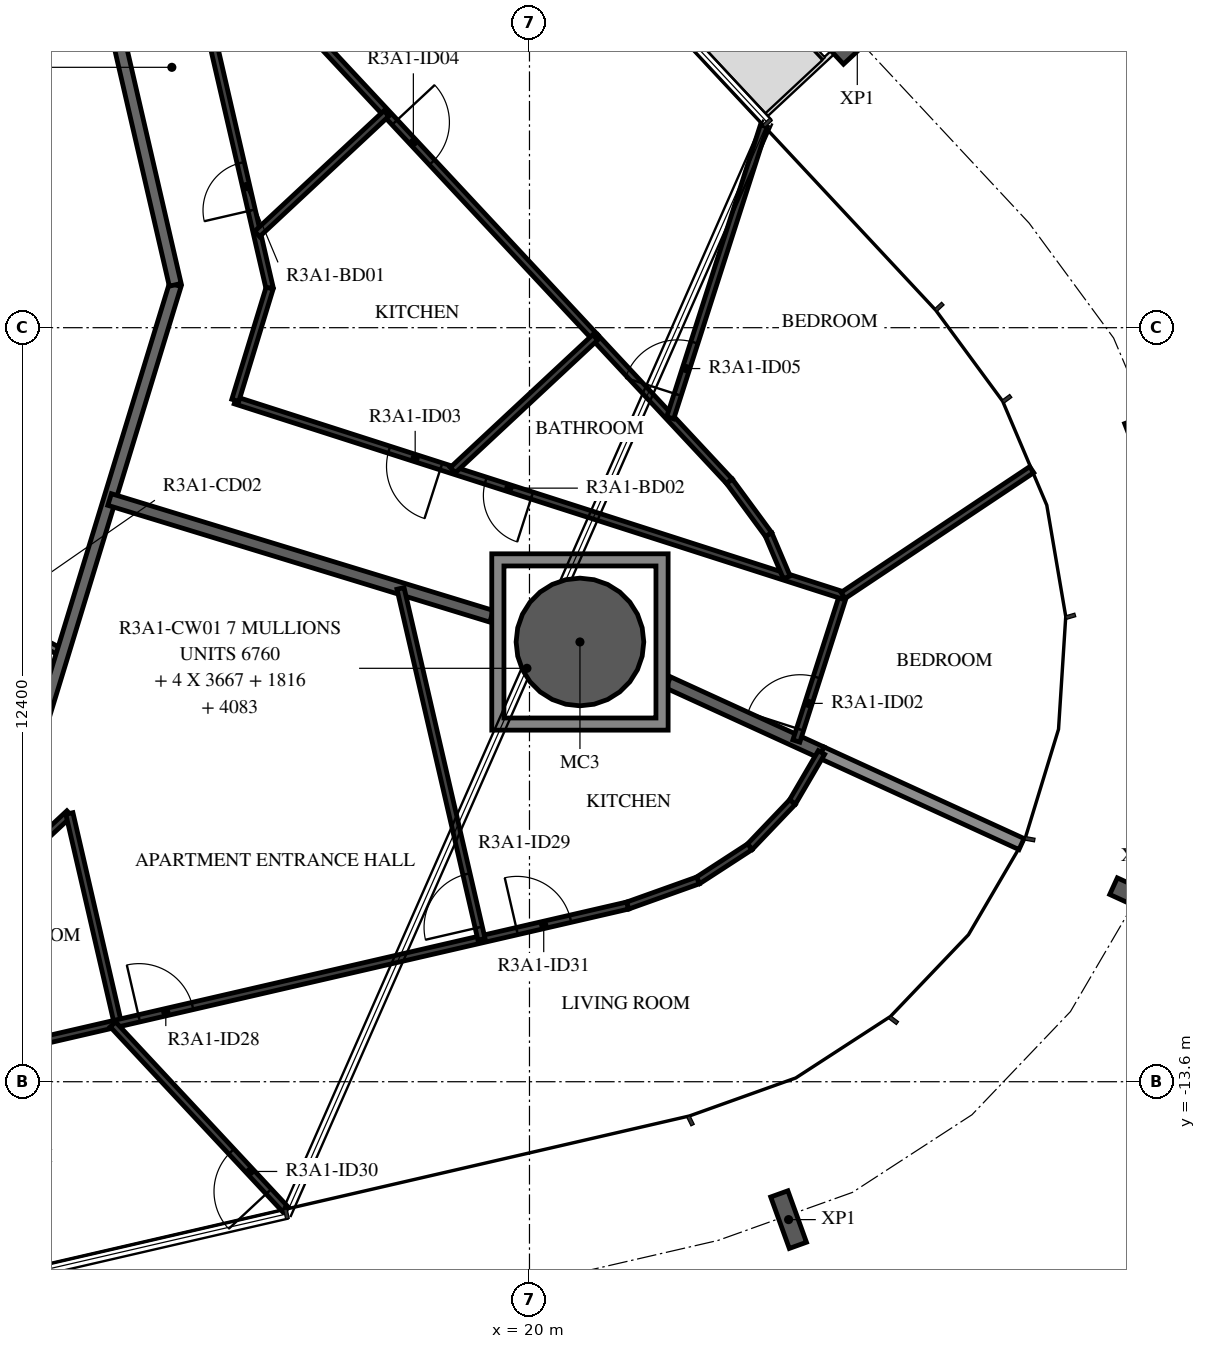
"""IFC4 building model, lengths in metres.
Left out: names, types, materials, properties, quantities, classifications, styles, units other than length and angle.
Written with IfcOpenShell. Run it as: python <this file> out.ifc"""

import sys

from ifc_helpers import new_model, si_unit, direction, frame, frame_2d, origin, origin_2d, place, context, subcontext, project, spatial, polyline, rectangle, hollow_circle, i_section, outline, extrude, element, fill, save


model = new_model("IFC4")
c1 = context("Model", 3, precision=1e-05, world=origin(), true_north=direction((0.0, 1.0)))
c2 = subcontext(c1, "Body", "Model", "MODEL_VIEW")
j1 = project(units=[si_unit("LENGTHUNIT", "METRE"), si_unit("PLANEANGLEUNIT", "RADIAN")], contexts=[c1])
p1 = place(None, origin())
s1 = spatial("IfcSite", under=j1, at=p1, CompositionType="ELEMENT")
p2 = place(p1, origin())
s2 = spatial("IfcBuilding", under=s1, at=p2, CompositionType="ELEMENT")
p3 = place(p2, frame((0.0, 0.0, 116.9)))
s3 = spatial("IfcBuildingStorey", under=s2, at=p3, CompositionType="ELEMENT", Elevation=116.9)
p4 = place(p3, frame((20.83, -6.368, -0.38), z_axis=(0.0, 0.0, 1.0), x_axis=(1.0, 0.0, 0.0)))
e1 = element("IfcColumn", 1, at=p4, inside=s3, PredefinedType="COLUMN", context=c2, shape_type="SweptSolid", body=[
    extrude(hollow_circle(Radius=1.05, WallThickness=0.05, at=origin_2d()), origin(), (0.0, 0.0, 1.0), 3.5),
])
for number, where, z_axis, x_axis in (
    (2, (24.261, -15.868, -0.38), (0.0, 0.0, 1.0), (-0.941, -0.34, 0.0)),
    (3, (30.014, -10.571, -0.38), (0.0, 0.0, 1.0), (-0.416, -0.909, 0.0)),
    (4, (30.262, -2.756, -0.38), (0.0, 0.0, 1.0), (0.358, -0.934, 0.0)),
    (5, (25.391, 3.55, -0.38), (0.0, 0.0, 1.0), (0.682, -0.731, 0.0)),
):
    element("IfcColumn", number, at=place(p3, frame(where, z_axis=z_axis, x_axis=x_axis)), inside=s3, PredefinedType="COLUMN", context=c2, shape_type="SweptSolid", body=[
        extrude(i_section(OverallWidth=0.3, OverallDepth=0.9, WebThickness=0.019, FlangeThickness=0.035, FilletRadius=0.03, at=origin_2d()), origin(), (0.0, 0.0, 1.0), 3.5),
    ])
p5 = place(p3, frame((10.511, -5.589, 0.0), z_axis=(0.0, 0.0, 1.0), x_axis=(0.882987820808, -0.469395897196, 0.0)))
e6 = element("IfcWall", 6, at=p5, inside=s3, PredefinedType="PARTITIONING", context=c2, shape_type="SweptSolid", body=[
    extrude(rectangle(XDim=2.052, YDim=0.12, at=frame_2d((1.026, 0.0))), origin(), (0.0, 0.0, 1.0), 3.12),
])
p6 = place(p5, frame((0.1, 0.0, 0.0)))
e7 = element("IfcOpeningElement", 7, at=p6, cuts=e6, PredefinedType="OPENING", context=c2, shape_type="SweptSolid", body=[
    extrude(rectangle(XDim=1.2, YDim=2.1, at=frame_2d((0.6, 1.05))), frame((0.0, 0.07, 0.0), z_axis=(0.0, -1.0, 0.0), x_axis=(1.0, 0.0, 0.0)), (0.0, 0.0, 1.0), 0.14),
])
p7 = place(p3, frame((12.028, -7.516, 0.0), z_axis=(0.0, 0.0, 1.0), x_axis=(0.292365533182, 0.956306642771, 0.0)))
e8 = element("IfcWall", 8, at=p7, inside=s3, PredefinedType="STANDARD", context=c2, shape_type="SweptSolid", body=[
    extrude(rectangle(XDim=7.342, YDim=0.2, at=frame_2d((3.671, 0.0))), origin(), (0.0, 0.0, 1.0), 3.12),
])
p8 = place(p3, frame((14.175, -0.495, 0.0), z_axis=(0.0, 0.0, 1.0), x_axis=(-0.224922649383, 0.974376622151, 0.0)))
e9 = element("IfcWall", 9, at=p8, inside=s3, PredefinedType="STANDARD", context=c2, shape_type="SweptSolid", body=[
    extrude(rectangle(XDim=7.342, YDim=0.2, at=frame_2d((3.671, 0.0))), origin(), (0.0, 0.0, 1.0), 3.12),
])
p9 = place(p3, frame((13.095, -4.026, 0.0), z_axis=(0.0, 0.0, 1.0), x_axis=(0.956303942966, -0.292374363904, 0.0)))
e10 = element("IfcWall", 10, at=p9, inside=s3, PredefinedType="STANDARD", context=c2, shape_type="SweptSolid", body=[
    extrude(rectangle(XDim=6.567, YDim=0.2, at=frame_2d((3.284, 0.0))), origin(), (0.0, 0.0, 1.0), 3.12),
])
p10 = place(p3, frame((22.28, -7.033, 0.0), z_axis=(0.0, 0.0, 1.0), x_axis=(0.909468768003, -0.415772245378, 0.0)))
e11 = element("IfcWall", 11, at=p10, inside=s3, PredefinedType="STANDARD", context=c2, shape_type="SweptSolid", body=[
    extrude(rectangle(XDim=2.773, YDim=0.2, at=frame_2d((1.386, 0.0))), origin(), (0.0, 0.0, 1.0), 3.12),
])
p11 = place(p3, frame((24.802, -8.186, 0.0), z_axis=(0.0, 0.0, 1.0), x_axis=(0.909307466213, -0.416124899387, 0.0)))
e12 = element("IfcWall", 12, at=p11, inside=s3, PredefinedType="STANDARD", context=c2, shape_type="SweptSolid", body=[
    extrude(rectangle(XDim=3.618, YDim=0.2, at=frame_2d((1.809, 0.0))), origin(), (0.0, 0.0, 1.0), 2.73),
])
p12 = place(p3, frame((15.727, -0.549, 0.0), z_axis=(0.0, 0.0, 1.0), x_axis=(-0.22493611855, 0.974373512864, 0.0)))
e13 = element("IfcWall", 13, at=p12, inside=s3, PredefinedType="PARTITIONING", context=c2, shape_type="SweptSolid", body=[
    extrude(rectangle(XDim=8.146, YDim=0.12, at=frame_2d((4.073, 0.0))), origin(), (0.0, 0.0, 1.0), 3.12),
])
p13 = place(p12, frame((1.314, 0.0, 0.0)))
e14 = element("IfcOpeningElement", 14, at=p13, cuts=e13, PredefinedType="OPENING", context=c2, shape_type="SweptSolid", body=[
    extrude(rectangle(XDim=0.8, YDim=2.1, at=frame_2d((0.4, 1.05))), frame((0.0, 0.07, 0.0), z_axis=(0.0, -1.0, 0.0), x_axis=(1.0, 0.0, 0.0)), (0.0, 0.0, 1.0), 0.14),
])
p14 = place(p3, frame((24.389, -7.997, 0.0), z_axis=(0.0, 0.0, 1.0), x_axis=(0.305723184389, 0.952120441188, 0.0)))
e15 = element("IfcWall", 15, at=p14, inside=s3, PredefinedType="PARTITIONING", context=c2, shape_type="SweptSolid", body=[
    extrude(rectangle(XDim=2.515, YDim=0.12, at=frame_2d((1.257, 0.0))), origin(), (0.0, 0.0, 1.0), 3.12),
])
p15 = place(p14, frame((0.2, 0.0, 0.0)))
e16 = element("IfcOpeningElement", 16, at=p15, cuts=e15, PredefinedType="OPENING", context=c2, shape_type="SweptSolid", body=[
    extrude(rectangle(XDim=0.9, YDim=2.1, at=frame_2d((0.45, 1.05))), frame((0.0, 0.07, 0.0), z_axis=(0.0, -1.0, 0.0), x_axis=(1.0, 0.0, 0.0)), (0.0, 0.0, 1.0), 0.14),
])
p16 = place(p3, frame((25.158, -5.603, 0.0), z_axis=(0.0, 0.0, 1.0), x_axis=(-0.952147783118, 0.305638019729, 0.0)))
e17 = element("IfcWall", 17, at=p16, inside=s3, PredefinedType="PARTITIONING", context=c2, shape_type="SweptSolid", body=[
    extrude(rectangle(XDim=10.498, YDim=0.12, at=frame_2d((5.249, 0.0))), origin(), (0.0, 0.0, 1.0), 3.12),
])
p17 = place(p16, frame((5.373, 0.0, 0.0)))
e18 = element("IfcOpeningElement", 18, at=p17, cuts=e17, PredefinedType="OPENING", context=c2, shape_type="SweptSolid", body=[
    extrude(rectangle(XDim=0.8, YDim=2.1, at=frame_2d((0.4, 1.05))), frame((0.0, 0.07, 0.0), z_axis=(0.0, -1.0, 0.0), x_axis=(1.0, 0.0, 0.0)), (0.0, 0.0, 1.0), 0.14),
])
p18 = place(p16, frame((6.941, 0.0, 0.0)))
e19 = element("IfcOpeningElement", 19, at=p18, cuts=e17, PredefinedType="OPENING", context=c2, shape_type="SweptSolid", body=[
    extrude(rectangle(XDim=0.9, YDim=2.1, at=frame_2d((0.45, 1.05))), frame((0.0, 0.07, 0.0), z_axis=(0.0, -1.0, 0.0), x_axis=(1.0, 0.0, 0.0)), (0.0, 0.0, 1.0), 0.14),
])
p19 = place(p3, frame((15.162, -2.395, 0.0), z_axis=(0.0, 0.0, 1.0), x_axis=(0.292404972776, 0.956294584266, 0.0)))
e20 = element("IfcWall", 20, at=p19, inside=s3, PredefinedType="PARTITIONING", context=c2, shape_type="SweptSolid", body=[
    extrude(rectangle(XDim=1.929, YDim=0.12, at=frame_2d((0.965, 0.0))), origin(), (0.0, 0.0, 1.0), 3.12),
])
p20 = place(p3, frame((14.213, 6.006, 0.0), z_axis=(0.0, 0.0, 1.0), x_axis=(0.681982148724, -0.731368818601, 0.0)))
e21 = element("IfcWall", 21, at=p20, inside=s3, PredefinedType="PARTITIONING", context=c2, shape_type="SweptSolid", body=[
    extrude(rectangle(XDim=10.07, YDim=0.12, at=frame_2d((5.035, 0.0))), origin(), (0.0, 0.0, 1.0), 3.12),
])
p21 = place(p20, frame((5.235, 0.0, 0.0)))
e22 = element("IfcOpeningElement", 22, at=p21, cuts=e21, PredefinedType="OPENING", context=c2, shape_type="SweptSolid", body=[
    extrude(rectangle(XDim=0.9, YDim=2.1, at=frame_2d((0.45, 1.05))), frame((0.0, 0.07, 0.0), z_axis=(0.0, -1.0, 0.0), x_axis=(1.0, 0.0, 0.0)), (0.0, 0.0, 1.0), 0.14),
])
p22 = place(p3, frame((21.081, -1.359, 0.0), z_axis=(0.0, 0.0, 1.0), x_axis=(0.682046729342, -0.731308593545, 0.0)))
e23 = element("IfcWall", 23, at=p22, inside=s3, PredefinedType="PARTITIONING", context=c2, shape_type="SweptSolid", body=[
    extrude(rectangle(XDim=3.236, YDim=0.12, at=frame_2d((1.618, 0.0))), origin(), (0.0, 0.0, 1.0), 3.12),
])
p23 = place(p3, frame((22.314, -2.681, 0.0), z_axis=(0.0, 0.0, 1.0), x_axis=(0.305629733216, 0.952150443036, 0.0)))
e24 = element("IfcWall", 24, at=p23, inside=s3, PredefinedType="PARTITIONING", context=c2, shape_type="SweptSolid", body=[
    extrude(rectangle(XDim=5.041, YDim=0.12, at=frame_2d((2.52, 0.0))), origin(), (0.0, 0.0, 1.0), 3.12),
])
p24 = place(p23, frame((0.4, 0.0, 0.0)))
e25 = element("IfcOpeningElement", 25, at=p24, cuts=e24, PredefinedType="OPENING", context=c2, shape_type="SweptSolid", body=[
    extrude(rectangle(XDim=0.9, YDim=2.1, at=frame_2d((0.45, 1.05))), frame((0.0, 0.07, 0.0), z_axis=(0.0, -1.0, 0.0), x_axis=(1.0, 0.0, 0.0)), (0.0, 0.0, 1.0), 0.14),
])
p25 = place(p3, frame((15.521, 0.341, 0.0), z_axis=(0.0, 0.0, 1.0), x_axis=(0.73140706136, 0.681941134257, 0.0)))
e26 = element("IfcWall", 26, at=p25, inside=s3, PredefinedType="PARTITIONING", context=c2, shape_type="SweptSolid", body=[
    extrude(rectangle(XDim=2.907, YDim=0.12, at=frame_2d((1.454, 0.0))), origin(), (0.0, 0.0, 1.0), 3.12),
])
p26 = place(p3, frame((28.259, -3.535, 0.0), z_axis=(0.0, 0.0, 1.0), x_axis=(-0.831969683957, -0.554821092765, 0.0)))
e27 = element("IfcWall", 27, at=p26, inside=s3, PredefinedType="PARTITIONING", context=c2, shape_type="SweptSolid", body=[
    extrude(rectangle(XDim=3.728, YDim=0.12, at=frame_2d((1.864, 0.0))), origin(), (0.0, 0.0, 1.0), 2.73),
])
p27 = place(p3, frame((24.231, -5.306, 0.0), z_axis=(0.0, 0.0, 1.0), x_axis=(-0.390836600732, 0.92046007601, 0.0)))
e28 = element("IfcWall", 28, at=p27, inside=s3, PredefinedType="PARTITIONING", context=c2, shape_type="SweptSolid", body=[
    extrude(rectangle(XDim=0.765, YDim=0.12, at=frame_2d((0.383, 0.0))), origin(), (0.0, 0.0, 1.0), 3.12),
])
p28 = place(p3, frame((23.932, -4.601, 0.0), z_axis=(0.0, 0.0, 1.0), x_axis=(-0.592463335142, 0.805597415904, 0.0)))
e29 = element("IfcWall", 29, at=p28, inside=s3, PredefinedType="PARTITIONING", context=c2, shape_type="SweptSolid", body=[
    extrude(rectangle(XDim=1.087, YDim=0.12, at=frame_2d((0.543, 0.0))), origin(), (0.0, 0.0, 1.0), 3.12),
])
p29 = place(p3, frame((21.081, -1.359, 0.0), z_axis=(0.0, 0.0, 1.0), x_axis=(-0.731341711004, -0.682011218196, 0.0)))
e30 = element("IfcWall", 30, at=p29, inside=s3, PredefinedType="PARTITIONING", context=c2, shape_type="SweptSolid", body=[
    extrude(rectangle(XDim=3.202, YDim=0.12, at=frame_2d((1.601, 0.0))), origin(), (0.0, 0.0, 1.0), 3.12),
])
p30 = place(p3, frame((7.388, -13.894, 0.0), z_axis=(0.0, 0.0, 1.0), x_axis=(0.731339966659, 0.682013088707, 0.0)))
e31 = element("IfcWall", 31, at=p30, inside=s3, PredefinedType="PARTITIONING", context=c2, shape_type="SweptSolid", body=[
    extrude(rectangle(XDim=6.899, YDim=0.12, at=frame_2d((3.45, 0.0))), origin(), (0.0, 0.0, 1.0), 3.12),
])
p31 = place(p30, frame((1.3, 0.0, 0.0)))
e32 = element("IfcOpeningElement", 32, at=p31, cuts=e31, PredefinedType="OPENING", context=c2, shape_type="SweptSolid", body=[
    extrude(rectangle(XDim=0.8, YDim=2.1, at=frame_2d((0.4, 1.05))), frame((0.0, 0.07, 0.0), z_axis=(0.0, -1.0, 0.0), x_axis=(1.0, 0.0, 0.0)), (0.0, 0.0, 1.0), 0.14),
])
p32 = place(p3, frame((12.434, -9.189, 0.0), z_axis=(0.0, 0.0, 1.0), x_axis=(0.224924972887, -0.974376085796, 0.0)))
e33 = element("IfcWall", 33, at=p32, inside=s3, PredefinedType="PARTITIONING", context=c2, shape_type="SweptSolid", body=[
    extrude(rectangle(XDim=3.541, YDim=0.12, at=frame_2d((1.771, 0.0))), origin(), (0.0, 0.0, 1.0), 3.12),
])
p33 = place(p3, frame((7.312, -14.005, 0.0), z_axis=(0.0, 0.0, 1.0), x_axis=(0.974367924791, 0.224960323474, 0.0)))
e34 = element("IfcWall", 34, at=p33, inside=s3, PredefinedType="PARTITIONING", context=c2, shape_type="SweptSolid", body=[
    extrude(rectangle(XDim=14.679, YDim=0.12, at=frame_2d((7.34, 0.0))), origin(), (0.0, 0.0, 1.0), 3.12),
])
p34 = place(p33, frame((6.433, 0.0, 0.0)))
e35 = element("IfcOpeningElement", 35, at=p34, cuts=e34, PredefinedType="OPENING", context=c2, shape_type="SweptSolid", body=[
    extrude(rectangle(XDim=0.9, YDim=2.1, at=frame_2d((0.45, 1.05))), frame((0.0, 0.07, 0.0), z_axis=(0.0, -1.0, 0.0), x_axis=(1.0, 0.0, 0.0)), (0.0, 0.0, 1.0), 0.14),
])
p35 = place(p33, frame((12.812, 0.0, 0.0)))
e36 = element("IfcOpeningElement", 36, at=p35, cuts=e34, PredefinedType="OPENING", context=c2, shape_type="SweptSolid", body=[
    extrude(rectangle(XDim=0.9, YDim=2.1, at=frame_2d((0.45, 1.05))), frame((0.0, 0.07, 0.0), z_axis=(0.0, -1.0, 0.0), x_axis=(1.0, 0.0, 0.0)), (0.0, 0.0, 1.0), 0.14),
])
p36 = place(p3, frame((19.211, -11.258, 0.0), z_axis=(0.0, 0.0, 1.0), x_axis=(-0.22499500936, 0.974359915926, 0.0)))
e37 = element("IfcWall", 37, at=p36, inside=s3, PredefinedType="PARTITIONING", context=c2, shape_type="SweptSolid", body=[
    extrude(rectangle(XDim=5.921, YDim=0.12, at=frame_2d((2.961, 0.0))), origin(), (0.0, 0.0, 1.0), 3.12),
])
p37 = place(p36, frame((0.2, 0.0, 0.0)))
e38 = element("IfcOpeningElement", 38, at=p37, cuts=e37, PredefinedType="OPENING", context=c2, shape_type="SweptSolid", body=[
    extrude(rectangle(XDim=0.9, YDim=2.1, at=frame_2d((0.45, 1.05))), frame((0.0, 0.07, 0.0), z_axis=(0.0, -1.0, 0.0), x_axis=(1.0, 0.0, 0.0)), (0.0, 0.0, 1.0), 0.14),
])
p38 = place(p3, frame((15.985, -15.698, 0.0), z_axis=(0.0, 0.0, 1.0), x_axis=(-0.681979185924, 0.731371581322, 0.0)))
e39 = element("IfcWall", 39, at=p38, inside=s3, PredefinedType="PARTITIONING", context=c2, shape_type="SweptSolid", body=[
    extrude(rectangle(XDim=4.157, YDim=0.12, at=frame_2d((2.079, 0.0))), origin(), (0.0, 0.0, 1.0), 3.12),
])
p39 = place(p38, frame((0.4, 0.0, 0.0)))
e40 = element("IfcOpeningElement", 40, at=p39, cuts=e39, PredefinedType="OPENING", context=c2, shape_type="SweptSolid", body=[
    extrude(rectangle(XDim=0.9, YDim=2.1, at=frame_2d((0.45, 1.05))), frame((0.0, 0.07, 0.0), z_axis=(0.0, -1.0, 0.0), x_axis=(1.0, 0.0, 0.0)), (0.0, 0.0, 1.0), 0.14),
])
p40 = place(p3, frame((24.802, -8.186, 0.0), z_axis=(0.0, 0.0, 1.0), x_axis=(-0.505043103481, -0.863094122113, 0.0)))
e41 = element("IfcWall", 41, at=p40, inside=s3, PredefinedType="PARTITIONING", context=c2, shape_type="SweptSolid", body=[
    extrude(rectangle(XDim=0.945, YDim=0.12, at=frame_2d((0.473, 0.0))), origin(), (0.0, 0.0, 1.0), 3.12),
])
for number, where, z_axis, x_axis in (
    (42, (24.324, -9.002, 0.0), (0.0, 0.0, 1.0), (-0.69, -0.723, 0.0)),
    (43, (23.623, -9.737, 0.0), (0.0, 0.0, 1.0), (-0.839, -0.545, 0.0)),
):
    element("IfcWall", number, at=place(p3, frame(where, z_axis=z_axis, x_axis=x_axis)), inside=s3, PredefinedType="PARTITIONING", context=c2, shape_type="SweptSolid", body=[
        extrude(rectangle(XDim=1.016, YDim=0.12, at=frame_2d((0.508, 0.0))), origin(), (0.0, 0.0, 1.0), 3.12),
    ])
p41 = place(p3, frame((22.771, -10.29, 0.0), z_axis=(0.0, 0.0, 1.0), x_axis=(-0.941701391526, -0.336449831623, 0.0)))
e44 = element("IfcWall", 44, at=p41, inside=s3, PredefinedType="PARTITIONING", context=c2, shape_type="SweptSolid", body=[
    extrude(rectangle(XDim=1.227, YDim=0.12, at=frame_2d((0.614, 0.0))), origin(), (0.0, 0.0, 1.0), 3.12),
])
p42 = place(p3, origin())
e45 = element("IfcWall", 45, at=p42, inside=s3, PredefinedType="STANDARD", context=c2, shape_type="SweptSolid", body=[
    extrude(outline(polyline([(22.28, -4.918), (22.28, -7.818), (19.38, -7.818), (19.38, -4.918), (22.28, -4.918)]), holes=[polyline([(19.58, -7.618), (22.08, -7.618), (22.08, -5.118), (19.58, -5.118), (19.58, -7.618)])]), origin(), (0.0, 0.0, 1.0), 3.12),
])
p43 = place(p13, origin())
e46 = element("IfcDoor", 46, at=p43, inside=s3, OperationType="SINGLE_SWING_LEFT", PredefinedType="DOOR", context=c2, shape_type="SweptSolid", body=[
    extrude(rectangle(XDim=0.8, YDim=2.1, at=frame_2d((0.4, 1.05))), frame((0.0, 0.025, 0.0), z_axis=(0.0, -1.0, 0.0), x_axis=(1.0, 0.0, 0.0)), (0.0, 0.0, 1.0), 0.05),
])
fill(e14, e46)
p44 = place(p15, origin())
e47 = element("IfcDoor", 47, at=p44, inside=s3, OperationType="SINGLE_SWING_LEFT", PredefinedType="DOOR", context=c2, shape_type="SweptSolid", body=[
    extrude(rectangle(XDim=0.9, YDim=2.1, at=frame_2d((0.45, 1.05))), frame((0.0, 0.025, 0.0), z_axis=(0.0, -1.0, 0.0), x_axis=(1.0, 0.0, 0.0)), (0.0, 0.0, 1.0), 0.05),
])
fill(e16, e47)
p45 = place(p17, origin())
e48 = element("IfcDoor", 48, at=p45, inside=s3, OperationType="SINGLE_SWING_LEFT", PredefinedType="DOOR", context=c2, shape_type="SweptSolid", body=[
    extrude(rectangle(XDim=0.8, YDim=2.1, at=frame_2d((0.4, 1.05))), frame((0.0, 0.025, 0.0), z_axis=(0.0, -1.0, 0.0), x_axis=(1.0, 0.0, 0.0)), (0.0, 0.0, 1.0), 0.05),
])
fill(e18, e48)
p46 = place(p18, origin())
e49 = element("IfcDoor", 49, at=p46, inside=s3, OperationType="SINGLE_SWING_LEFT", PredefinedType="DOOR", context=c2, shape_type="SweptSolid", body=[
    extrude(rectangle(XDim=0.9, YDim=2.1, at=frame_2d((0.45, 1.05))), frame((0.0, 0.025, 0.0), z_axis=(0.0, -1.0, 0.0), x_axis=(1.0, 0.0, 0.0)), (0.0, 0.0, 1.0), 0.05),
])
fill(e19, e49)
p47 = place(p21, origin())
e50 = element("IfcDoor", 50, at=p47, inside=s3, OperationType="SINGLE_SWING_LEFT", PredefinedType="DOOR", context=c2, shape_type="SweptSolid", body=[
    extrude(rectangle(XDim=0.9, YDim=2.1, at=frame_2d((0.45, 1.05))), frame((0.0, 0.025, 0.0), z_axis=(0.0, -1.0, 0.0), x_axis=(1.0, 0.0, 0.0)), (0.0, 0.0, 1.0), 0.05),
])
fill(e22, e50)
p48 = place(p24, origin())
e51 = element("IfcDoor", 51, at=p48, inside=s3, OperationType="SINGLE_SWING_LEFT", PredefinedType="DOOR", context=c2, shape_type="SweptSolid", body=[
    extrude(rectangle(XDim=0.9, YDim=2.1, at=frame_2d((0.45, 1.05))), frame((0.0, 0.025, 0.0), z_axis=(0.0, -1.0, 0.0), x_axis=(1.0, 0.0, 0.0)), (0.0, 0.0, 1.0), 0.05),
])
fill(e25, e51)
p49 = place(p34, origin())
e52 = element("IfcDoor", 52, at=p49, inside=s3, OperationType="SINGLE_SWING_RIGHT", PredefinedType="DOOR", context=c2, shape_type="SweptSolid", body=[
    extrude(rectangle(XDim=0.9, YDim=2.1, at=frame_2d((0.45, 1.05))), frame((0.0, 0.025, 0.0), z_axis=(0.0, -1.0, 0.0), x_axis=(1.0, 0.0, 0.0)), (0.0, 0.0, 1.0), 0.05),
])
fill(e35, e52)
p50 = place(p37, origin())
e53 = element("IfcDoor", 53, at=p50, inside=s3, OperationType="SINGLE_SWING_RIGHT", PredefinedType="DOOR", context=c2, shape_type="SweptSolid", body=[
    extrude(rectangle(XDim=0.9, YDim=2.1, at=frame_2d((0.45, 1.05))), frame((0.0, 0.025, 0.0), z_axis=(0.0, -1.0, 0.0), x_axis=(1.0, 0.0, 0.0)), (0.0, 0.0, 1.0), 0.05),
])
fill(e38, e53)
p51 = place(p39, origin())
e54 = element("IfcDoor", 54, at=p51, inside=s3, OperationType="SINGLE_SWING_LEFT", PredefinedType="DOOR", context=c2, shape_type="SweptSolid", body=[
    extrude(rectangle(XDim=0.9, YDim=2.1, at=frame_2d((0.45, 1.05))), frame((0.0, 0.025, 0.0), z_axis=(0.0, -1.0, 0.0), x_axis=(1.0, 0.0, 0.0)), (0.0, 0.0, 1.0), 0.05),
])
fill(e40, e54)
p52 = place(p35, origin())
e55 = element("IfcDoor", 55, at=p52, inside=s3, OperationType="SINGLE_SWING_LEFT", PredefinedType="DOOR", context=c2, shape_type="SweptSolid", body=[
    extrude(rectangle(XDim=0.9, YDim=2.1, at=frame_2d((0.45, 1.05))), frame((0.0, 0.025, 0.0), z_axis=(0.0, -1.0, 0.0), x_axis=(1.0, 0.0, 0.0)), (0.0, 0.0, 1.0), 0.05),
])
fill(e36, e55)
save(model, sys.argv[1])
